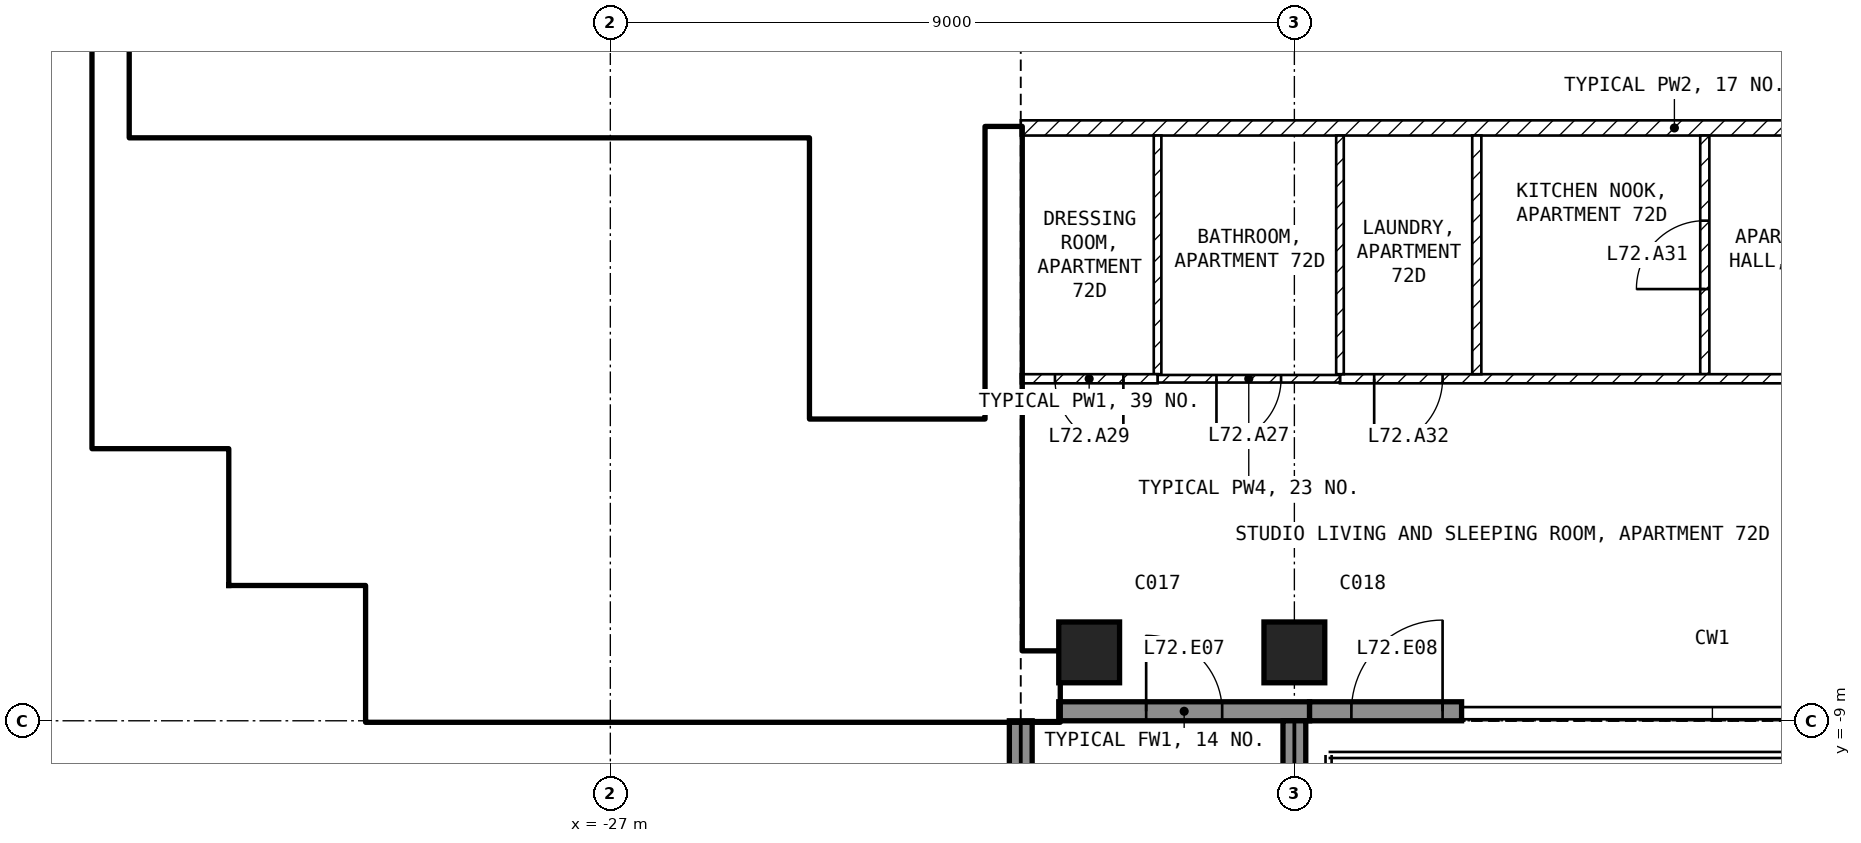
"""IFC4 building model, lengths in metres.
Left out: names, types, materials, properties, quantities, classifications, styles, units other than length and angle.
Written with IfcOpenShell. Run it as: python <this file> out.ifc"""

import sys

from ifc_helpers import new_model, si_unit, direction, frame, frame_2d, origin, origin_2d, place, context, subcontext, project, spatial, rectangle, extrude, element, fill, save


model = new_model("IFC4")
c1 = context("Model", 3, precision=1e-05, world=origin(), true_north=direction((0.0, 1.0)))
c2 = subcontext(c1, "Body", "Model", "MODEL_VIEW")
j1 = project(units=[si_unit("LENGTHUNIT", "METRE"), si_unit("PLANEANGLEUNIT", "RADIAN")], contexts=[c1])
p1 = place(None, origin())
s1 = spatial("IfcSite", under=j1, at=p1, CompositionType="ELEMENT")
p2 = place(p1, origin())
s2 = spatial("IfcBuilding", under=s1, at=p2, CompositionType="ELEMENT")
p3 = place(p2, frame((0.0, 0.0, 281.5)))
s3 = spatial("IfcBuildingStorey", under=s2, at=p3, CompositionType="ELEMENT", Elevation=281.5)
for number, where, z_axis, x_axis in (
    (1, (-20.7, -8.1, -0.25), (0.0, 0.0, 1.0), (1.0, 0.0, 0.0)),
    (2, (-18.0, -8.1, -0.25), (0.0, 0.0, 1.0), (1.0, 0.0, 0.0)),
):
    element("IfcColumn", number, at=place(p3, frame(where, z_axis=z_axis, x_axis=x_axis)), inside=s3, PredefinedType="COLUMN", context=c2, shape_type="SweptSolid", body=[
        extrude(rectangle(XDim=0.8, YDim=0.8, at=origin_2d()), origin(), (0.0, 0.0, 1.0), 3.45),
    ])
p4 = place(p3, frame((-21.1, -8.875, 0.0), z_axis=(0.0, 0.0, 1.0), x_axis=(1.0, 0.0, 0.0)))
e3 = element("IfcWall", 3, at=p4, inside=s3, PredefinedType="SOLIDWALL", context=c2, shape_type="SweptSolid", body=[
    extrude(rectangle(XDim=3.3, YDim=0.25, at=frame_2d((1.65, 0.0))), origin(), (0.0, 0.0, 1.0), 3.2),
])
p5 = place(p4, frame((1.15, 0.0, 0.0)))
e4 = element("IfcOpeningElement", 4, at=p5, cuts=e3, PredefinedType="OPENING", context=c2, shape_type="SweptSolid", body=[
    extrude(rectangle(XDim=1.0, YDim=2.4, at=frame_2d((0.5, 1.2))), frame((0.0, 0.135, 0.0), z_axis=(0.0, -1.0, 0.0), x_axis=(1.0, 0.0, 0.0)), (0.0, 0.0, 1.0), 0.27),
])
p6 = place(p3, frame((-17.8, -8.875, 0.0), z_axis=(0.0, 0.0, 1.0), x_axis=(1.0, 0.0, 0.0)))
e5 = element("IfcWall", 5, at=p6, inside=s3, PredefinedType="SOLIDWALL", context=c2, shape_type="SweptSolid", body=[
    extrude(rectangle(XDim=2.0, YDim=0.25, at=frame_2d((1.0, 0.0))), origin(), (0.0, 0.0, 1.0), 3.2),
])
p7 = place(p6, frame((0.55, 0.0, 0.0)))
e6 = element("IfcOpeningElement", 6, at=p7, cuts=e5, PredefinedType="OPENING", context=c2, shape_type="SweptSolid", body=[
    extrude(rectangle(XDim=1.2, YDim=2.4, at=frame_2d((0.6, 1.2))), frame((0.0, 0.135, 0.0), z_axis=(0.0, -1.0, 0.0), x_axis=(1.0, 0.0, 0.0)), (0.0, 0.0, 1.0), 0.27),
])
p8 = place(p3, frame((-21.6, -9.0, 0.0), z_axis=(0.0, 0.0, 1.0), x_axis=(0.0, -1.0, 0.0)))
e7 = element("IfcWall", 7, at=p8, inside=s3, PredefinedType="SOLIDWALL", context=c2, shape_type="SweptSolid", body=[
    extrude(rectangle(XDim=2.7, YDim=0.3, at=frame_2d((1.35, 0.0))), origin(), (0.0, 0.0, 1.0), 3.2),
])
p9 = place(p3, frame((-18.0, -9.0, 0.0), z_axis=(0.0, 0.0, 1.0), x_axis=(0.0, -1.0, 0.0)))
e8 = element("IfcWall", 8, at=p9, inside=s3, PredefinedType="SOLIDWALL", context=c2, shape_type="SweptSolid", body=[
    extrude(rectangle(XDim=2.74, YDim=0.3, at=frame_2d((1.37, 0.0))), origin(), (0.0, 0.0, 1.0), 3.2),
])
p10 = place(p3, frame((-30.2, -8.55, 0.0), z_axis=(0.0, 0.0, 1.0), x_axis=(1.0, 0.0, 0.0)))
e9 = element("IfcWall", 9, at=p10, inside=s3, PredefinedType="SHEAR", context=c2, shape_type="SweptSolid", body=[
    extrude(rectangle(XDim=9.1, YDim=0.9, at=frame_2d((4.55, 0.0))), origin(), (0.0, 0.0, 1.0), 3.2),
])
p11 = place(p3, frame((-29.975, -8.1, 0.0), z_axis=(0.0, 0.0, 1.0), x_axis=(0.0, 1.0, 0.0)))
e10 = element("IfcWall", 10, at=p11, inside=s3, PredefinedType="SHEAR", context=c2, shape_type="SweptSolid", body=[
    extrude(rectangle(XDim=1.35, YDim=0.45, at=frame_2d((0.675, 0.0))), origin(), (0.0, 0.0, 1.0), 3.2),
])
for number, where, z_axis, x_axis in (
    (11, (-32.0, -6.975, 0.0), (0.0, 0.0, 1.0), (1.0, 0.0, 0.0)),
    (12, (-31.775, -6.75, 0.0), (0.0, 0.0, 1.0), (0.0, 1.0, 0.0)),
    (13, (-33.8, -5.175, 0.0), (0.0, 0.0, 1.0), (1.0, 0.0, 0.0)),
):
    element("IfcWall", number, at=place(p3, frame(where, z_axis=z_axis, x_axis=x_axis)), inside=s3, PredefinedType="SHEAR", context=c2, shape_type="SweptSolid", body=[
        extrude(rectangle(XDim=1.8, YDim=0.45, at=frame_2d((0.9, 0.0))), origin(), (0.0, 0.0, 1.0), 3.2),
    ])
p12 = place(p3, frame((-33.575, -4.95, 0.0), z_axis=(0.0, 0.0, 1.0), x_axis=(0.0, 1.0, 0.0)))
e14 = element("IfcWall", 14, at=p12, inside=s3, PredefinedType="SHEAR", context=c2, shape_type="SweptSolid", body=[
    extrude(rectangle(XDim=10.35, YDim=0.45, at=frame_2d((5.175, 0.0))), origin(), (0.0, 0.0, 1.0), 3.2),
])
p13 = place(p3, frame((-21.825, -8.1, 0.0), z_axis=(0.0, 0.0, 1.0), x_axis=(0.0, 1.0, 0.0)))
e15 = element("IfcWall", 15, at=p13, inside=s3, PredefinedType="SHEAR", context=c2, shape_type="SweptSolid", body=[
    extrude(rectangle(XDim=6.9, YDim=0.45, at=frame_2d((3.45, 0.0))), origin(), (0.0, 0.0, 1.0), 3.2),
])
p14 = place(p3, frame((-24.5, -5.05, 0.0), z_axis=(0.0, 0.0, 1.0), x_axis=(0.0, 1.0, 0.0)))
e16 = element("IfcWall", 16, at=p14, inside=s3, PredefinedType="SOLIDWALL", context=c2, shape_type="SweptSolid", body=[
    extrude(rectangle(XDim=3.7, YDim=0.2, at=frame_2d((1.85, 0.0))), origin(), (0.0, 0.0, 1.0), 3.2),
])
p15 = place(p14, frame((0.1, 0.0, 0.0)))
e17 = element("IfcOpeningElement", 17, at=p15, cuts=e16, PredefinedType="OPENING", context=c2, shape_type="SweptSolid", body=[
    extrude(rectangle(XDim=0.8, YDim=2.1, at=frame_2d((0.4, 1.05))), frame((0.0, 0.11, 0.0), z_axis=(0.0, -1.0, 0.0), x_axis=(1.0, 0.0, 0.0)), (0.0, 0.0, 1.0), 0.22),
])
p16 = place(p3, frame((-28.35, -5.15, 0.0), z_axis=(0.0, 0.0, 1.0), x_axis=(1.0, 0.0, 0.0)))
e18 = element("IfcWall", 18, at=p16, inside=s3, PredefinedType="SOLIDWALL", context=c2, shape_type="SweptSolid", body=[
    extrude(rectangle(XDim=6.3, YDim=0.2, at=frame_2d((3.15, 0.0))), origin(), (0.0, 0.0, 1.0), 3.2),
])
p17 = place(p16, frame((5.1, 0.0, 0.0)))
e19 = element("IfcOpeningElement", 19, at=p17, cuts=e18, PredefinedType="OPENING", context=c2, shape_type="SweptSolid", body=[
    extrude(rectangle(XDim=1.0, YDim=2.1, at=frame_2d((0.5, 1.05))), frame((0.0, 0.11, 0.0), z_axis=(0.0, -1.0, 0.0), x_axis=(1.0, 0.0, 0.0)), (0.0, 0.0, 1.0), 0.22),
])
p18 = place(p3, frame((-28.25, -8.1, 0.0), z_axis=(0.0, 0.0, 1.0), x_axis=(0.0, 1.0, 0.0)))
e20 = element("IfcWall", 20, at=p18, inside=s3, PredefinedType="SOLIDWALL", context=c2, shape_type="SweptSolid", body=[
    extrude(rectangle(XDim=2.85, YDim=0.2, at=frame_2d((1.425, 0.0))), origin(), (0.0, 0.0, 1.0), 3.2),
])
p19 = place(p3, frame((-33.35, -1.45, 0.0), z_axis=(0.0, 0.0, 1.0), x_axis=(1.0, 0.0, 0.0)))
e21 = element("IfcWall", 21, at=p19, inside=s3, PredefinedType="SOLIDWALL", context=c2, shape_type="SweptSolid", body=[
    extrude(rectangle(XDim=8.75, YDim=0.2, at=frame_2d((4.375, 0.0))), origin(), (0.0, 0.0, 1.0), 3.2),
])
p20 = place(p19, frame((7.35, 0.0, 0.0)))
e22 = element("IfcOpeningElement", 22, at=p20, cuts=e21, PredefinedType="OPENING", context=c2, shape_type="SweptSolid", body=[
    extrude(rectangle(XDim=1.0, YDim=2.1, at=frame_2d((0.5, 1.05))), frame((0.0, 0.11, 0.0), z_axis=(0.0, -1.0, 0.0), x_axis=(1.0, 0.0, 0.0)), (0.0, 0.0, 1.0), 0.22),
])
p21 = place(p19, frame((5.35, 0.0, 0.0)))
e23 = element("IfcOpeningElement", 23, at=p21, cuts=e21, PredefinedType="OPENING", context=c2, shape_type="SweptSolid", body=[
    extrude(rectangle(XDim=1.0, YDim=2.1, at=frame_2d((0.5, 1.05))), frame((0.0, 0.11, 0.0), z_axis=(0.0, -1.0, 0.0), x_axis=(1.0, 0.0, 0.0)), (0.0, 0.0, 1.0), 0.22),
])
p22 = place(p19, frame((3.35, 0.0, 0.0)))
e24 = element("IfcOpeningElement", 24, at=p22, cuts=e21, PredefinedType="OPENING", context=c2, shape_type="SweptSolid", body=[
    extrude(rectangle(XDim=1.0, YDim=2.1, at=frame_2d((0.5, 1.05))), frame((0.0, 0.11, 0.0), z_axis=(0.0, -1.0, 0.0), x_axis=(1.0, 0.0, 0.0)), (0.0, 0.0, 1.0), 0.22),
])
p23 = place(p19, frame((0.925, 0.0, 0.0)))
e25 = element("IfcOpeningElement", 25, at=p23, cuts=e21, PredefinedType="OPENING", context=c2, shape_type="SweptSolid", body=[
    extrude(rectangle(XDim=0.9, YDim=2.1, at=frame_2d((0.45, 1.05))), frame((0.0, 0.11, 0.0), z_axis=(0.0, -1.0, 0.0), x_axis=(1.0, 0.0, 0.0)), (0.0, 0.0, 1.0), 0.22),
])
p24 = place(p3, frame((-33.35, -3.95, 0.0), z_axis=(0.0, 0.0, 1.0), x_axis=(1.0, 0.0, 0.0)))
e26 = element("IfcWall", 26, at=p24, inside=s3, PredefinedType="SOLIDWALL", context=c2, shape_type="SweptSolid", body=[
    extrude(rectangle(XDim=8.75, YDim=0.2, at=frame_2d((4.375, 0.0))), origin(), (0.0, 0.0, 1.0), 3.2),
])
for number, where, z_axis, x_axis in (
    (27, (-26.5, -3.85, 0.0), (0.0, 0.0, 1.0), (0.0, 1.0, 0.0)),
    (28, (-28.5, -3.85, 0.0), (0.0, 0.0, 1.0), (0.0, 1.0, 0.0)),
    (29, (-30.5, -3.85, 0.0), (0.0, 0.0, 1.0), (0.0, 1.0, 0.0)),
):
    element("IfcWall", number, at=place(p3, frame(where, z_axis=z_axis, x_axis=x_axis)), inside=s3, PredefinedType="SOLIDWALL", context=c2, shape_type="SweptSolid", body=[
        extrude(rectangle(XDim=2.3, YDim=0.2, at=frame_2d((1.15, 0.0))), origin(), (0.0, 0.0, 1.0), 3.2),
    ])
p25 = place(p3, frame((-27.4, -5.05, 0.0), z_axis=(0.0, 0.0, 1.0), x_axis=(0.0, 1.0, 0.0)))
e30 = element("IfcWall", 30, at=p25, inside=s3, PredefinedType="PARTITIONING", context=c2, shape_type="SweptSolid", body=[
    extrude(rectangle(XDim=1.0, YDim=0.15, at=frame_2d((0.5, 0.0))), origin(), (0.0, 0.0, 1.0), 3.2),
])
p26 = place(p25, frame((0.1, 0.0, 0.0)))
e31 = element("IfcOpeningElement", 31, at=p26, cuts=e30, PredefinedType="OPENING", context=c2, shape_type="SweptSolid", body=[
    extrude(rectangle(XDim=0.8, YDim=2.1, at=frame_2d((0.4, 1.05))), frame((0.0, 0.085, 0.0), z_axis=(0.0, -1.0, 0.0), x_axis=(1.0, 0.0, 0.0)), (0.0, 0.0, 1.0), 0.17),
])
p27 = place(p3, frame((-4.4, -1.2, 0.0), z_axis=(0.0, 0.0, 1.0), x_axis=(-1.0, 0.0, 0.0)))
e32 = element("IfcWall", 32, at=p27, inside=s3, PredefinedType="PARTITIONING", context=c2, shape_type="SweptSolid", body=[
    extrude(rectangle(XDim=17.2, YDim=0.2, at=frame_2d((8.6, 0.0))), origin(), (0.0, 0.0, 1.0), 3.2),
])
p28 = place(p27, frame((5.9, 0.0, 0.0)))
e33 = element("IfcOpeningElement", 33, at=p28, cuts=e32, PredefinedType="OPENING", context=c2, shape_type="SweptSolid", body=[
    extrude(rectangle(XDim=1.0, YDim=2.1, at=frame_2d((0.5, 1.05))), frame((0.0, 0.11, 0.0), z_axis=(0.0, -1.0, 0.0), x_axis=(1.0, 0.0, 0.0)), (0.0, 0.0, 1.0), 0.22),
])
p29 = place(p3, frame((-12.6, -4.44, 0.0), z_axis=(0.0, 0.0, 1.0), x_axis=(0.0, 1.0, 0.0)))
e34 = element("IfcWall", 34, at=p29, inside=s3, PredefinedType="PARTITIONING", context=c2, shape_type="SweptSolid", body=[
    extrude(rectangle(XDim=3.14, YDim=0.12, at=frame_2d((1.57, 0.0))), origin(), (0.0, 0.0, 1.0), 3.2),
])
p30 = place(p29, frame((1.12, 0.0, 0.0)))
e35 = element("IfcOpeningElement", 35, at=p30, cuts=e34, PredefinedType="OPENING", context=c2, shape_type="SweptSolid", body=[
    extrude(rectangle(XDim=0.9, YDim=2.1, at=frame_2d((0.45, 1.05))), frame((0.0, 0.07, 0.0), z_axis=(0.0, -1.0, 0.0), x_axis=(1.0, 0.0, 0.0)), (0.0, 0.0, 1.0), 0.14),
])
p31 = place(p3, frame((-8.94, -4.5, 0.0), z_axis=(0.0, 0.0, 1.0), x_axis=(-1.0, 0.0, 0.0)))
e36 = element("IfcWall", 36, at=p31, inside=s3, PredefinedType="PARTITIONING", context=c2, shape_type="SweptSolid", body=[
    extrude(rectangle(XDim=8.46, YDim=0.12, at=frame_2d((4.23, 0.0))), origin(), (0.0, 0.0, 1.0), 3.2),
])
p32 = place(p31, frame((7.11, 0.0, 0.0)))
e37 = element("IfcOpeningElement", 37, at=p32, cuts=e36, PredefinedType="OPENING", context=c2, shape_type="SweptSolid", body=[
    extrude(rectangle(XDim=0.9, YDim=2.1, at=frame_2d((0.45, 1.05))), frame((0.0, 0.07, 0.0), z_axis=(0.0, -1.0, 0.0), x_axis=(1.0, 0.0, 0.0)), (0.0, 0.0, 1.0), 0.14),
])
p33 = place(p31, frame((1.41, 0.0, 0.0)))
e38 = element("IfcOpeningElement", 38, at=p33, cuts=e36, PredefinedType="OPENING", context=c2, shape_type="SweptSolid", body=[
    extrude(rectangle(XDim=0.9, YDim=2.1, at=frame_2d((0.45, 1.05))), frame((0.0, 0.07, 0.0), z_axis=(0.0, -1.0, 0.0), x_axis=(1.0, 0.0, 0.0)), (0.0, 0.0, 1.0), 0.14),
])
p34 = place(p3, frame((-15.6, -4.44, 0.0), z_axis=(0.0, 0.0, 1.0), x_axis=(0.0, 1.0, 0.0)))
e39 = element("IfcWall", 39, at=p34, inside=s3, PredefinedType="PARTITIONING", context=c2, shape_type="SweptSolid", body=[
    extrude(rectangle(XDim=3.14, YDim=0.12, at=frame_2d((1.57, 0.0))), origin(), (0.0, 0.0, 1.0), 3.2),
])
for number, where, z_axis, x_axis in (
    (40, (-17.4, -4.44, 0.0), (0.0, 0.0, 1.0), (0.0, 1.0, 0.0)),
    (41, (-19.8, -4.44, 0.0), (0.0, 0.0, 1.0), (0.0, 1.0, 0.0)),
):
    element("IfcWall", number, at=place(p3, frame(where, z_axis=z_axis, x_axis=x_axis)), inside=s3, PredefinedType="PARTITIONING", context=c2, shape_type="SweptSolid", body=[
        extrude(rectangle(XDim=3.14, YDim=0.1, at=frame_2d((1.57, 0.0))), origin(), (0.0, 0.0, 1.0), 3.2),
    ])
p35 = place(p3, frame((-17.4, -4.5, 0.0), z_axis=(0.0, 0.0, 1.0), x_axis=(-1.0, 0.0, 0.0)))
e42 = element("IfcWall", 42, at=p35, inside=s3, PredefinedType="PARTITIONING", context=c2, shape_type="SweptSolid", body=[
    extrude(rectangle(XDim=2.4, YDim=0.1, at=frame_2d((1.2, 0.0))), origin(), (0.0, 0.0, 1.0), 3.2),
])
p36 = place(p35, frame((0.775, 0.0, 0.0)))
e43 = element("IfcOpeningElement", 43, at=p36, cuts=e42, PredefinedType="OPENING", context=c2, shape_type="SweptSolid", body=[
    extrude(rectangle(XDim=0.85, YDim=2.1, at=frame_2d((0.425, 1.05))), frame((0.0, 0.06, 0.0), z_axis=(0.0, -1.0, 0.0), x_axis=(1.0, 0.0, 0.0)), (0.0, 0.0, 1.0), 0.12),
])
p37 = place(p3, frame((-19.8, -4.5, 0.0), z_axis=(0.0, 0.0, 1.0), x_axis=(-1.0, 0.0, 0.0)))
e44 = element("IfcWall", 44, at=p37, inside=s3, PredefinedType="PARTITIONING", context=c2, shape_type="SweptSolid", body=[
    extrude(rectangle(XDim=1.8, YDim=0.12, at=frame_2d((0.9, 0.0))), origin(), (0.0, 0.0, 1.0), 3.2),
])
p38 = place(p37, frame((0.45, 0.0, 0.0)))
e45 = element("IfcOpeningElement", 45, at=p38, cuts=e44, PredefinedType="OPENING", context=c2, shape_type="SweptSolid", body=[
    extrude(rectangle(XDim=0.9, YDim=2.1, at=frame_2d((0.45, 1.05))), frame((0.0, 0.07, 0.0), z_axis=(0.0, -1.0, 0.0), x_axis=(1.0, 0.0, 0.0)), (0.0, 0.0, 1.0), 0.14),
])
p39 = place(p5, origin())
e46 = element("IfcDoor", 46, at=p39, inside=s3, OperationType="SINGLE_SWING_LEFT", PredefinedType="DOOR", context=c2, shape_type="SweptSolid", body=[
    extrude(rectangle(XDim=1.0, YDim=2.4, at=frame_2d((0.5, 1.2))), frame((0.0, 0.025, 0.0), z_axis=(0.0, -1.0, 0.0), x_axis=(1.0, 0.0, 0.0)), (0.0, 0.0, 1.0), 0.05),
])
fill(e4, e46)
p40 = place(p7, origin())
e47 = element("IfcDoor", 47, at=p40, inside=s3, OperationType="SINGLE_SWING_RIGHT", PredefinedType="DOOR", context=c2, shape_type="SweptSolid", body=[
    extrude(rectangle(XDim=1.2, YDim=2.4, at=frame_2d((0.6, 1.2))), frame((0.0, 0.025, 0.0), z_axis=(0.0, -1.0, 0.0), x_axis=(1.0, 0.0, 0.0)), (0.0, 0.0, 1.0), 0.05),
])
fill(e6, e47)
p41 = place(p20, origin())
e48 = element("IfcDoor", 48, at=p41, inside=s3, OperationType="DOUBLE_DOOR_SLIDING", PredefinedType="DOOR", context=c2, shape_type="SweptSolid", body=[
    extrude(rectangle(XDim=1.0, YDim=2.1, at=frame_2d((0.5, 1.05))), frame((0.0, 0.025, 0.0), z_axis=(0.0, -1.0, 0.0), x_axis=(1.0, 0.0, 0.0)), (0.0, 0.0, 1.0), 0.05),
])
fill(e22, e48)
p42 = place(p21, origin())
e49 = element("IfcDoor", 49, at=p42, inside=s3, OperationType="DOUBLE_DOOR_SLIDING", PredefinedType="DOOR", context=c2, shape_type="SweptSolid", body=[
    extrude(rectangle(XDim=1.0, YDim=2.1, at=frame_2d((0.5, 1.05))), frame((0.0, 0.025, 0.0), z_axis=(0.0, -1.0, 0.0), x_axis=(1.0, 0.0, 0.0)), (0.0, 0.0, 1.0), 0.05),
])
fill(e23, e49)
p43 = place(p22, origin())
e50 = element("IfcDoor", 50, at=p43, inside=s3, OperationType="DOUBLE_DOOR_SLIDING", PredefinedType="DOOR", context=c2, shape_type="SweptSolid", body=[
    extrude(rectangle(XDim=1.0, YDim=2.1, at=frame_2d((0.5, 1.05))), frame((0.0, 0.025, 0.0), z_axis=(0.0, -1.0, 0.0), x_axis=(1.0, 0.0, 0.0)), (0.0, 0.0, 1.0), 0.05),
])
fill(e24, e50)
p44 = place(p17, origin())
e51 = element("IfcDoor", 51, at=p44, inside=s3, OperationType="SINGLE_SWING_LEFT", PredefinedType="DOOR", context=c2, shape_type="SweptSolid", body=[
    extrude(rectangle(XDim=1.0, YDim=2.1, at=frame_2d((0.5, 1.05))), frame((0.0, 0.025, 0.0), z_axis=(0.0, -1.0, 0.0), x_axis=(1.0, 0.0, 0.0)), (0.0, 0.0, 1.0), 0.05),
])
fill(e19, e51)
p45 = place(p15, origin())
e52 = element("IfcDoor", 52, at=p45, inside=s3, OperationType="SINGLE_SWING_LEFT", PredefinedType="DOOR", context=c2, shape_type="SweptSolid", body=[
    extrude(rectangle(XDim=0.8, YDim=2.1, at=frame_2d((0.4, 1.05))), frame((0.0, 0.025, 0.0), z_axis=(0.0, -1.0, 0.0), x_axis=(1.0, 0.0, 0.0)), (0.0, 0.0, 1.0), 0.05),
])
fill(e17, e52)
p46 = place(p26, origin())
e53 = element("IfcDoor", 53, at=p46, inside=s3, OperationType="SINGLE_SWING_LEFT", PredefinedType="DOOR", context=c2, shape_type="SweptSolid", body=[
    extrude(rectangle(XDim=0.8, YDim=2.1, at=frame_2d((0.4, 1.05))), frame((0.0, 0.025, 0.0), z_axis=(0.0, -1.0, 0.0), x_axis=(1.0, 0.0, 0.0)), (0.0, 0.0, 1.0), 0.05),
])
fill(e31, e53)
p47 = place(p23, origin())
e54 = element("IfcDoor", 54, at=p47, inside=s3, OperationType="SINGLE_SWING_LEFT", PredefinedType="DOOR", context=c2, shape_type="SweptSolid", body=[
    extrude(rectangle(XDim=0.9, YDim=2.1, at=frame_2d((0.45, 1.05))), frame((0.0, 0.025, 0.0), z_axis=(0.0, -1.0, 0.0), x_axis=(1.0, 0.0, 0.0)), (0.0, 0.0, 1.0), 0.05),
])
fill(e25, e54)
p48 = place(p36, origin())
e55 = element("IfcDoor", 55, at=p48, inside=s3, OperationType="SINGLE_SWING_RIGHT", PredefinedType="DOOR", context=c2, shape_type="SweptSolid", body=[
    extrude(rectangle(XDim=0.85, YDim=2.1, at=frame_2d((0.425, 1.05))), frame((0.0, 0.025, 0.0), z_axis=(0.0, -1.0, 0.0), x_axis=(1.0, 0.0, 0.0)), (0.0, 0.0, 1.0), 0.05),
])
fill(e43, e55)
p49 = place(p38, origin())
e56 = element("IfcDoor", 56, at=p49, inside=s3, OperationType="SINGLE_SWING_LEFT", PredefinedType="DOOR", context=c2, shape_type="SweptSolid", body=[
    extrude(rectangle(XDim=0.9, YDim=2.1, at=frame_2d((0.45, 1.05))), frame((0.0, 0.025, 0.0), z_axis=(0.0, -1.0, 0.0), x_axis=(1.0, 0.0, 0.0)), (0.0, 0.0, 1.0), 0.05),
])
fill(e45, e56)
p50 = place(p30, origin())
e57 = element("IfcDoor", 57, at=p50, inside=s3, OperationType="SINGLE_SWING_LEFT", PredefinedType="DOOR", context=c2, shape_type="SweptSolid", body=[
    extrude(rectangle(XDim=0.9, YDim=2.1, at=frame_2d((0.45, 1.05))), frame((0.0, 0.025, 0.0), z_axis=(0.0, -1.0, 0.0), x_axis=(1.0, 0.0, 0.0)), (0.0, 0.0, 1.0), 0.05),
])
fill(e35, e57)
p51 = place(p32, origin())
e58 = element("IfcDoor", 58, at=p51, inside=s3, OperationType="SINGLE_SWING_RIGHT", PredefinedType="DOOR", context=c2, shape_type="SweptSolid", body=[
    extrude(rectangle(XDim=0.9, YDim=2.1, at=frame_2d((0.45, 1.05))), frame((0.0, 0.025, 0.0), z_axis=(0.0, -1.0, 0.0), x_axis=(1.0, 0.0, 0.0)), (0.0, 0.0, 1.0), 0.05),
])
fill(e37, e58)
save(model, sys.argv[1])
